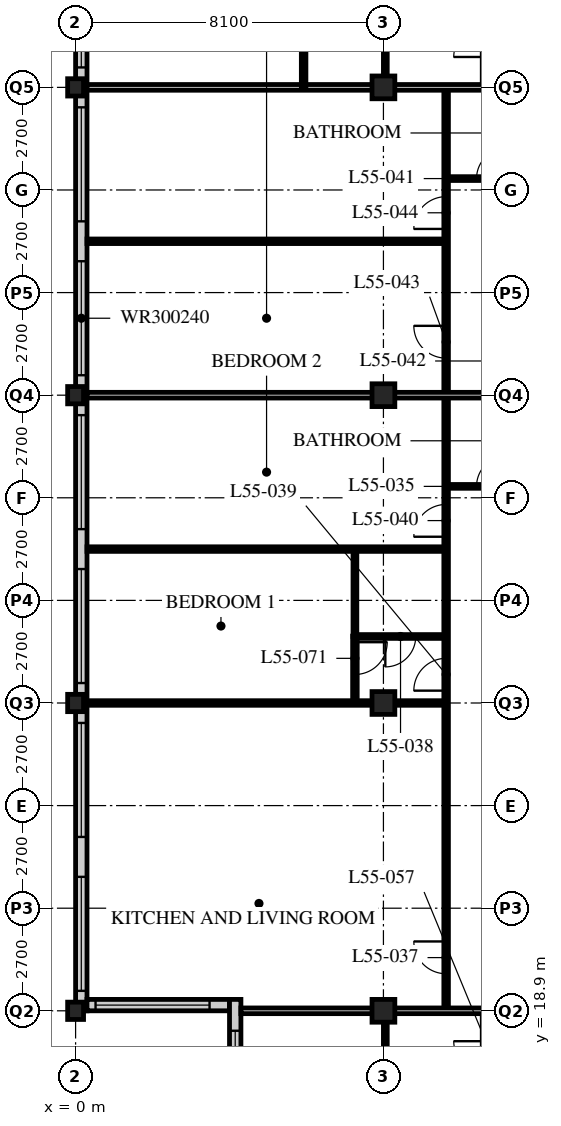
"""IFC4 building model, lengths in metres.
Left out: names, types, materials, properties, quantities, classifications, styles, units other than length and angle.
Written with IfcOpenShell. Run it as: python <this file> out.ifc"""

import sys

from ifc_helpers import new_model, si_unit, direction, frame, frame_2d, origin, origin_2d, place, context, subcontext, project, spatial, rectangle, hollow_rectangle, i_section, extrude, element, fill, save


model = new_model("IFC4")
c1 = context("Model", 3, precision=1e-05, world=origin(), true_north=direction((0.0, 1.0)))
c2 = subcontext(c1, "Body", "Model", "MODEL_VIEW")
j1 = project(units=[si_unit("LENGTHUNIT", "METRE"), si_unit("PLANEANGLEUNIT", "RADIAN")], contexts=[c1])
p1 = place(None, origin())
s1 = spatial("IfcSite", under=j1, at=p1, CompositionType="ELEMENT")
p2 = place(p1, origin())
s2 = spatial("IfcBuilding", under=s1, at=p2, CompositionType="ELEMENT")
p3 = place(p2, frame((0.0, 0.0, 213.6)))
s3 = spatial("IfcBuildingStorey", under=s2, at=p3, CompositionType="ELEMENT", Elevation=213.6)
for number, where, z_axis, x_axis in (
    (1, (0.0, 18.9, 0.0), (0.0, 0.0, 1.0), (1.0, 0.0, 0.0)),
    (2, (0.0, 27.0, 0.0), (0.0, 0.0, 1.0), (1.0, 0.0, 0.0)),
    (3, (0.0, 35.1, 0.0), (0.0, 0.0, 1.0), (1.0, 0.0, 0.0)),
    (4, (0.0, 43.2, 0.0), (0.0, 0.0, 1.0), (1.0, 0.0, 0.0)),
):
    element("IfcColumn", number, at=place(p3, frame(where, z_axis=z_axis, x_axis=x_axis)), inside=s3, PredefinedType="COLUMN", context=c2, shape_type="SweptSolid", body=[
        extrude(i_section(OverallWidth=0.418, OverallDepth=0.456, WebThickness=0.042, FlangeThickness=0.067, FilletRadius=0.015, at=origin_2d()), origin(), (0.0, 0.0, 1.0), 3.6),
    ])
for number, where, z_axis, x_axis in (
    (5, (8.1, 18.9, 0.0), (0.0, 0.0, 1.0), (1.0, 0.0, 0.0)),
    (6, (8.1, 27.0, 0.0), (0.0, 0.0, 1.0), (1.0, 0.0, 0.0)),
    (7, (8.1, 35.1, 0.0), (0.0, 0.0, 1.0), (1.0, 0.0, 0.0)),
    (8, (8.1, 43.2, 0.0), (0.0, 0.0, 1.0), (1.0, 0.0, 0.0)),
):
    element("IfcColumn", number, at=place(p3, frame(where, z_axis=z_axis, x_axis=x_axis)), inside=s3, PredefinedType="COLUMN", context=c2, shape_type="SweptSolid", body=[
        extrude(hollow_rectangle(XDim=0.6, YDim=0.6, WallThickness=0.05, at=origin_2d()), origin(), (0.0, 0.0, 1.0), 3.6),
    ])
p4 = place(p3, frame((0.15, 51.0, 0.0), z_axis=(0.0, 0.0, 1.0), x_axis=(0.0, -1.0, 0.0)))
e9 = element("IfcWall", 9, at=p4, inside=s3, PredefinedType="SOLIDWALL", context=c2, shape_type="SweptSolid", body=[
    extrude(rectangle(XDim=32.1, YDim=0.3, at=frame_2d((16.05, 0.0))), origin(), (0.0, 0.0, 1.0), 3.39),
])
p5 = place(p4, frame((0.225, 0.0, 0.6)))
e10 = element("IfcOpeningElement", 10, at=p5, cuts=e9, PredefinedType="OPENING", context=c2, shape_type="SweptSolid", body=[
    extrude(rectangle(XDim=3.0, YDim=2.4, at=frame_2d((1.5, 1.2))), frame((0.0, 0.16, 0.0), z_axis=(0.0, -1.0, 0.0), x_axis=(1.0, 0.0, 0.0)), (0.0, 0.0, 1.0), 0.32),
])
p6 = place(p4, frame((4.275, 0.0, 0.6)))
e11 = element("IfcOpeningElement", 11, at=p6, cuts=e9, PredefinedType="OPENING", context=c2, shape_type="SweptSolid", body=[
    extrude(rectangle(XDim=3.0, YDim=2.4, at=frame_2d((1.5, 1.2))), frame((0.0, 0.16, 0.0), z_axis=(0.0, -1.0, 0.0), x_axis=(1.0, 0.0, 0.0)), (0.0, 0.0, 1.0), 0.32),
])
p7 = place(p4, frame((8.325, 0.0, 0.6)))
e12 = element("IfcOpeningElement", 12, at=p7, cuts=e9, PredefinedType="OPENING", context=c2, shape_type="SweptSolid", body=[
    extrude(rectangle(XDim=3.0, YDim=2.4, at=frame_2d((1.5, 1.2))), frame((0.0, 0.16, 0.0), z_axis=(0.0, -1.0, 0.0), x_axis=(1.0, 0.0, 0.0)), (0.0, 0.0, 1.0), 0.32),
])
p8 = place(p4, frame((12.375, 0.0, 0.6)))
e13 = element("IfcOpeningElement", 13, at=p8, cuts=e9, PredefinedType="OPENING", context=c2, shape_type="SweptSolid", body=[
    extrude(rectangle(XDim=3.0, YDim=2.4, at=frame_2d((1.5, 1.2))), frame((0.0, 0.16, 0.0), z_axis=(0.0, -1.0, 0.0), x_axis=(1.0, 0.0, 0.0)), (0.0, 0.0, 1.0), 0.32),
])
p9 = place(p4, frame((16.425, 0.0, 0.6)))
e14 = element("IfcOpeningElement", 14, at=p9, cuts=e9, PredefinedType="OPENING", context=c2, shape_type="SweptSolid", body=[
    extrude(rectangle(XDim=3.0, YDim=2.4, at=frame_2d((1.5, 1.2))), frame((0.0, 0.16, 0.0), z_axis=(0.0, -1.0, 0.0), x_axis=(1.0, 0.0, 0.0)), (0.0, 0.0, 1.0), 0.32),
])
p10 = place(p4, frame((20.475, 0.0, 0.6)))
e15 = element("IfcOpeningElement", 15, at=p10, cuts=e9, PredefinedType="OPENING", context=c2, shape_type="SweptSolid", body=[
    extrude(rectangle(XDim=3.0, YDim=2.4, at=frame_2d((1.5, 1.2))), frame((0.0, 0.16, 0.0), z_axis=(0.0, -1.0, 0.0), x_axis=(1.0, 0.0, 0.0)), (0.0, 0.0, 1.0), 0.32),
])
p11 = place(p4, frame((24.525, 0.0, 0.6)))
e16 = element("IfcOpeningElement", 16, at=p11, cuts=e9, PredefinedType="OPENING", context=c2, shape_type="SweptSolid", body=[
    extrude(rectangle(XDim=3.0, YDim=2.4, at=frame_2d((1.5, 1.2))), frame((0.0, 0.16, 0.0), z_axis=(0.0, -1.0, 0.0), x_axis=(1.0, 0.0, 0.0)), (0.0, 0.0, 1.0), 0.32),
])
p12 = place(p4, frame((28.575, 0.0, 0.6)))
e17 = element("IfcOpeningElement", 17, at=p12, cuts=e9, PredefinedType="OPENING", context=c2, shape_type="SweptSolid", body=[
    extrude(rectangle(XDim=3.0, YDim=2.4, at=frame_2d((1.5, 1.2))), frame((0.0, 0.16, 0.0), z_axis=(0.0, -1.0, 0.0), x_axis=(1.0, 0.0, 0.0)), (0.0, 0.0, 1.0), 0.32),
])
p13 = place(p3, frame((0.3, 19.05, 0.0), z_axis=(0.0, 0.0, 1.0), x_axis=(1.0, 0.0, 0.0)))
e18 = element("IfcWall", 18, at=p13, inside=s3, PredefinedType="SOLIDWALL", context=c2, shape_type="SweptSolid", body=[
    extrude(rectangle(XDim=3.75, YDim=0.3, at=frame_2d((1.875, 0.0))), origin(), (0.0, 0.0, 1.0), 3.39),
])
p14 = place(p13, frame((0.225, 0.0, 0.6)))
e19 = element("IfcOpeningElement", 19, at=p14, cuts=e18, PredefinedType="OPENING", context=c2, shape_type="SweptSolid", body=[
    extrude(rectangle(XDim=3.0, YDim=2.0, at=frame_2d((1.5, 1.0))), frame((0.0, 0.16, 0.0), z_axis=(0.0, -1.0, 0.0), x_axis=(1.0, 0.0, 0.0)), (0.0, 0.0, 1.0), 0.32),
])
p15 = place(p3, frame((4.2, 19.2, 0.0), z_axis=(0.0, 0.0, 1.0), x_axis=(0.0, -1.0, 0.0)))
e20 = element("IfcWall", 20, at=p15, inside=s3, PredefinedType="SOLIDWALL", context=c2, shape_type="SweptSolid", body=[
    extrude(rectangle(XDim=4.35, YDim=0.3, at=frame_2d((2.175, 0.0))), origin(), (0.0, 0.0, 1.0), 3.39),
])
p16 = place(p15, frame((0.825, 0.0, 0.6)))
e21 = element("IfcOpeningElement", 21, at=p16, cuts=e20, PredefinedType="OPENING", context=c2, shape_type="SweptSolid", body=[
    extrude(rectangle(XDim=3.0, YDim=2.0, at=frame_2d((1.5, 1.0))), frame((0.0, 0.16, 0.0), z_axis=(0.0, -1.0, 0.0), x_axis=(1.0, 0.0, 0.0)), (0.0, 0.0, 1.0), 0.32),
])
p17 = place(p3, frame((9.75, 18.9, 0.0), z_axis=(0.0, 0.0, 1.0), x_axis=(0.0, 1.0, 0.0)))
e22 = element("IfcWall", 22, at=p17, inside=s3, PredefinedType="PARTITIONING", context=c2, shape_type="SweptSolid", body=[
    extrude(rectangle(XDim=24.3, YDim=0.12, at=frame_2d((12.15, 0.0))), origin(), (0.0, 0.0, 1.0), 3.39),
])
p18 = place(p17, frame((0.975, 0.0, 0.0)))
e23 = element("IfcOpeningElement", 23, at=p18, cuts=e22, PredefinedType="OPENING", context=c2, shape_type="SweptSolid", body=[
    extrude(rectangle(XDim=0.85, YDim=2.1, at=frame_2d((0.425, 1.05))), frame((0.0, 0.07, 0.0), z_axis=(0.0, -1.0, 0.0), x_axis=(1.0, 0.0, 0.0)), (0.0, 0.0, 1.0), 0.14),
])
p19 = place(p17, frame((8.425, 0.0, 0.0)))
e24 = element("IfcOpeningElement", 24, at=p19, cuts=e22, PredefinedType="OPENING", context=c2, shape_type="SweptSolid", body=[
    extrude(rectangle(XDim=0.85, YDim=2.1, at=frame_2d((0.425, 1.05))), frame((0.0, 0.07, 0.0), z_axis=(0.0, -1.0, 0.0), x_axis=(1.0, 0.0, 0.0)), (0.0, 0.0, 1.0), 0.14),
])
p20 = place(p17, frame((12.475, 0.0, 0.0)))
e25 = element("IfcOpeningElement", 25, at=p20, cuts=e22, PredefinedType="OPENING", context=c2, shape_type="SweptSolid", body=[
    extrude(rectangle(XDim=0.85, YDim=2.1, at=frame_2d((0.425, 1.05))), frame((0.0, 0.07, 0.0), z_axis=(0.0, -1.0, 0.0), x_axis=(1.0, 0.0, 0.0)), (0.0, 0.0, 1.0), 0.14),
])
p21 = place(p17, frame((17.175, 0.0, 0.0)))
e26 = element("IfcOpeningElement", 26, at=p21, cuts=e22, PredefinedType="OPENING", context=c2, shape_type="SweptSolid", body=[
    extrude(rectangle(XDim=0.85, YDim=2.1, at=frame_2d((0.425, 1.05))), frame((0.0, 0.07, 0.0), z_axis=(0.0, -1.0, 0.0), x_axis=(1.0, 0.0, 0.0)), (0.0, 0.0, 1.0), 0.14),
])
p22 = place(p17, frame((20.575, 0.0, 0.0)))
e27 = element("IfcOpeningElement", 27, at=p22, cuts=e22, PredefinedType="OPENING", context=c2, shape_type="SweptSolid", body=[
    extrude(rectangle(XDim=0.85, YDim=2.1, at=frame_2d((0.425, 1.05))), frame((0.0, 0.07, 0.0), z_axis=(0.0, -1.0, 0.0), x_axis=(1.0, 0.0, 0.0)), (0.0, 0.0, 1.0), 0.14),
])
p23 = place(p3, frame((12.15, 32.7, 0.0), z_axis=(0.0, 0.0, 1.0), x_axis=(-1.0, 0.0, 0.0)))
e28 = element("IfcWall", 28, at=p23, inside=s3, PredefinedType="PARTITIONING", context=c2, shape_type="SweptSolid", body=[
    extrude(rectangle(XDim=2.4, YDim=0.1, at=frame_2d((1.2, 0.0))), origin(), (0.0, 0.0, 1.0), 3.39),
])
p24 = place(p23, frame((0.8, 0.0, 0.0)))
e29 = element("IfcOpeningElement", 29, at=p24, cuts=e28, PredefinedType="OPENING", context=c2, shape_type="SweptSolid", body=[
    extrude(rectangle(XDim=0.8, YDim=2.1, at=frame_2d((0.4, 1.05))), frame((0.0, 0.06, 0.0), z_axis=(0.0, -1.0, 0.0), x_axis=(1.0, 0.0, 0.0)), (0.0, 0.0, 1.0), 0.12),
])
p25 = place(p3, frame((9.75, 28.75, 0.0), z_axis=(0.0, 0.0, 1.0), x_axis=(-1.0, 0.0, 0.0)))
e30 = element("IfcWall", 30, at=p25, inside=s3, PredefinedType="PARTITIONING", context=c2, shape_type="SweptSolid", body=[
    extrude(rectangle(XDim=2.4, YDim=0.1, at=frame_2d((1.2, 0.0))), origin(), (0.0, 0.0, 1.0), 3.39),
])
p26 = place(p25, frame((0.8, 0.0, 0.0)))
e31 = element("IfcOpeningElement", 31, at=p26, cuts=e30, PredefinedType="OPENING", context=c2, shape_type="SweptSolid", body=[
    extrude(rectangle(XDim=0.8, YDim=2.1, at=frame_2d((0.4, 1.05))), frame((0.0, 0.06, 0.0), z_axis=(0.0, -1.0, 0.0), x_axis=(1.0, 0.0, 0.0)), (0.0, 0.0, 1.0), 0.12),
])
p27 = place(p3, frame((7.35, 28.75, 0.0), z_axis=(0.0, 0.0, 1.0), x_axis=(0.0, 1.0, 0.0)))
e32 = element("IfcWall", 32, at=p27, inside=s3, PredefinedType="PARTITIONING", context=c2, shape_type="SweptSolid", body=[
    extrude(rectangle(XDim=2.3, YDim=0.1, at=frame_2d((1.15, 0.0))), origin(), (0.0, 0.0, 1.0), 3.39),
])
p28 = place(p3, frame((9.75, 27.0, 0.0), z_axis=(0.0, 0.0, 1.0), x_axis=(-1.0, 0.0, 0.0)))
e33 = element("IfcWall", 33, at=p28, inside=s3, PredefinedType="PARTITIONING", context=c2, shape_type="SweptSolid", body=[
    extrude(rectangle(XDim=9.45, YDim=0.12, at=frame_2d((4.725, 0.0))), origin(), (0.0, 0.0, 1.0), 2.778),
])
p29 = place(p3, frame((9.75, 31.05, 0.0), z_axis=(0.0, 0.0, 1.0), x_axis=(-1.0, 0.0, 0.0)))
e34 = element("IfcWall", 34, at=p29, inside=s3, PredefinedType="PARTITIONING", context=c2, shape_type="SweptSolid", body=[
    extrude(rectangle(XDim=9.45, YDim=0.12, at=frame_2d((4.725, 0.0))), origin(), (0.0, 0.0, 1.0), 3.39),
])
p30 = place(p3, frame((12.15, 35.1, 0.0), z_axis=(0.0, 0.0, 1.0), x_axis=(-1.0, 0.0, 0.0)))
e35 = element("IfcWall", 35, at=p30, inside=s3, PredefinedType="PARTITIONING", context=c2, shape_type="SweptSolid", body=[
    extrude(rectangle(XDim=11.85, YDim=0.15, at=frame_2d((5.925, 0.0))), origin(), (0.0, 0.0, 1.0), 2.778),
])
p31 = place(p3, frame((12.15, 40.8, 0.0), z_axis=(0.0, 0.0, 1.0), x_axis=(-1.0, 0.0, 0.0)))
e36 = element("IfcWall", 36, at=p31, inside=s3, PredefinedType="PARTITIONING", context=c2, shape_type="SweptSolid", body=[
    extrude(rectangle(XDim=2.4, YDim=0.1, at=frame_2d((1.2, 0.0))), origin(), (0.0, 0.0, 1.0), 3.39),
])
p32 = place(p31, frame((0.8, 0.0, 0.0)))
e37 = element("IfcOpeningElement", 37, at=p32, cuts=e36, PredefinedType="OPENING", context=c2, shape_type="SweptSolid", body=[
    extrude(rectangle(XDim=0.8, YDim=2.1, at=frame_2d((0.4, 1.05))), frame((0.0, 0.06, 0.0), z_axis=(0.0, -1.0, 0.0), x_axis=(1.0, 0.0, 0.0)), (0.0, 0.0, 1.0), 0.12),
])
p33 = place(p3, frame((9.75, 39.15, 0.0), z_axis=(0.0, 0.0, 1.0), x_axis=(-1.0, 0.0, 0.0)))
e38 = element("IfcWall", 38, at=p33, inside=s3, PredefinedType="PARTITIONING", context=c2, shape_type="SweptSolid", body=[
    extrude(rectangle(XDim=9.45, YDim=0.12, at=frame_2d((4.725, 0.0))), origin(), (0.0, 0.0, 1.0), 3.39),
])
p34 = place(p3, frame((8.15, 18.9, 0.0), z_axis=(0.0, 0.0, 1.0), x_axis=(0.0, -1.0, 0.0)))
e39 = element("IfcWall", 39, at=p34, inside=s3, PredefinedType="PARTITIONING", context=c2, shape_type="SweptSolid", body=[
    extrude(rectangle(XDim=2.4, YDim=0.1, at=frame_2d((1.2, 0.0))), origin(), (0.0, 0.0, 1.0), 2.778),
])
p35 = place(p3, frame((4.35, 18.9, 0.0), z_axis=(0.0, 0.0, 1.0), x_axis=(1.0, 0.0, 0.0)))
e40 = element("IfcWall", 40, at=p35, inside=s3, PredefinedType="PARTITIONING", context=c2, shape_type="SweptSolid", body=[
    extrude(rectangle(XDim=7.8, YDim=0.15, at=frame_2d((3.9, 0.0))), origin(), (0.0, 0.0, 1.0), 2.778),
])
p36 = place(p3, frame((8.15, 43.2, 0.0), z_axis=(0.0, 0.0, 1.0), x_axis=(0.0, 1.0, 0.0)))
e41 = element("IfcWall", 41, at=p36, inside=s3, PredefinedType="PARTITIONING", context=c2, shape_type="SweptSolid", body=[
    extrude(rectangle(XDim=2.4, YDim=0.1, at=frame_2d((1.2, 0.0))), origin(), (0.0, 0.0, 1.0), 2.778),
])
p37 = place(p3, frame((0.3, 43.2, 0.0), z_axis=(0.0, 0.0, 1.0), x_axis=(1.0, 0.0, 0.0)))
e42 = element("IfcWall", 42, at=p37, inside=s3, PredefinedType="PARTITIONING", context=c2, shape_type="SweptSolid", body=[
    extrude(rectangle(XDim=11.85, YDim=0.15, at=frame_2d((5.925, 0.0))), origin(), (0.0, 0.0, 1.0), 2.778),
])
p38 = place(p3, frame((7.35, 27.0, 0.0), z_axis=(0.0, 0.0, 1.0), x_axis=(0.0, 1.0, 0.0)))
e43 = element("IfcWall", 43, at=p38, inside=s3, PredefinedType="PARTITIONING", context=c2, shape_type="SweptSolid", body=[
    extrude(rectangle(XDim=1.76, YDim=0.12, at=frame_2d((0.88, 0.0))), origin(), (0.0, 0.0, 1.0), 3.39),
])
p39 = place(p38, frame((0.75, 0.0, 0.0)))
e44 = element("IfcOpeningElement", 44, at=p39, cuts=e43, PredefinedType="OPENING", context=c2, shape_type="SweptSolid", body=[
    extrude(rectangle(XDim=0.85, YDim=2.1, at=frame_2d((0.425, 1.05))), frame((0.0, 0.07, 0.0), z_axis=(0.0, -1.0, 0.0), x_axis=(1.0, 0.0, 0.0)), (0.0, 0.0, 1.0), 0.14),
])
p40 = place(p3, frame((6.0, 43.2, 0.0), z_axis=(0.0, 0.0, 1.0), x_axis=(0.0, 1.0, 0.0)))
e45 = element("IfcWall", 45, at=p40, inside=s3, PredefinedType="PARTITIONING", context=c2, shape_type="SweptSolid", body=[
    extrude(rectangle(XDim=11.85, YDim=0.12, at=frame_2d((5.925, 0.0))), origin(), (0.0, 0.0, 1.0), 3.39),
])
p41 = place(p40, frame((5.5, 0.0, 0.0)))
e46 = element("IfcOpeningElement", 46, at=p41, cuts=e45, PredefinedType="OPENING", context=c2, shape_type="SweptSolid", body=[
    extrude(rectangle(XDim=0.85, YDim=2.1, at=frame_2d((0.425, 1.05))), frame((0.0, 0.07, 0.0), z_axis=(0.0, -1.0, 0.0), x_axis=(1.0, 0.0, 0.0)), (0.0, 0.0, 1.0), 0.14),
])
p42 = place(p6, origin())
e47 = element("IfcWindow", 47, at=p42, inside=s3, PartitioningType="SINGLE_PANEL", PredefinedType="WINDOW", context=c2, shape_type="SweptSolid", body=[
    extrude(rectangle(XDim=3.0, YDim=2.4, at=frame_2d((1.5, 1.2))), frame((0.0, 0.03, 0.0), z_axis=(0.0, -1.0, 0.0), x_axis=(1.0, 0.0, 0.0)), (0.0, 0.0, 1.0), 0.06),
])
fill(e11, e47)
p43 = place(p7, origin())
e48 = element("IfcWindow", 48, at=p43, inside=s3, PartitioningType="SINGLE_PANEL", PredefinedType="WINDOW", context=c2, shape_type="SweptSolid", body=[
    extrude(rectangle(XDim=3.0, YDim=2.4, at=frame_2d((1.5, 1.2))), frame((0.0, 0.03, 0.0), z_axis=(0.0, -1.0, 0.0), x_axis=(1.0, 0.0, 0.0)), (0.0, 0.0, 1.0), 0.06),
])
fill(e12, e48)
p44 = place(p8, origin())
e49 = element("IfcWindow", 49, at=p44, inside=s3, PartitioningType="SINGLE_PANEL", PredefinedType="WINDOW", context=c2, shape_type="SweptSolid", body=[
    extrude(rectangle(XDim=3.0, YDim=2.4, at=frame_2d((1.5, 1.2))), frame((0.0, 0.03, 0.0), z_axis=(0.0, -1.0, 0.0), x_axis=(1.0, 0.0, 0.0)), (0.0, 0.0, 1.0), 0.06),
])
fill(e13, e49)
p45 = place(p9, origin())
e50 = element("IfcWindow", 50, at=p45, inside=s3, PartitioningType="SINGLE_PANEL", PredefinedType="WINDOW", context=c2, shape_type="SweptSolid", body=[
    extrude(rectangle(XDim=3.0, YDim=2.4, at=frame_2d((1.5, 1.2))), frame((0.0, 0.03, 0.0), z_axis=(0.0, -1.0, 0.0), x_axis=(1.0, 0.0, 0.0)), (0.0, 0.0, 1.0), 0.06),
])
fill(e14, e50)
p46 = place(p10, origin())
e51 = element("IfcWindow", 51, at=p46, inside=s3, PartitioningType="SINGLE_PANEL", PredefinedType="WINDOW", context=c2, shape_type="SweptSolid", body=[
    extrude(rectangle(XDim=3.0, YDim=2.4, at=frame_2d((1.5, 1.2))), frame((0.0, 0.03, 0.0), z_axis=(0.0, -1.0, 0.0), x_axis=(1.0, 0.0, 0.0)), (0.0, 0.0, 1.0), 0.06),
])
fill(e15, e51)
p47 = place(p11, origin())
e52 = element("IfcWindow", 52, at=p47, inside=s3, PartitioningType="SINGLE_PANEL", PredefinedType="WINDOW", context=c2, shape_type="SweptSolid", body=[
    extrude(rectangle(XDim=3.0, YDim=2.4, at=frame_2d((1.5, 1.2))), frame((0.0, 0.03, 0.0), z_axis=(0.0, -1.0, 0.0), x_axis=(1.0, 0.0, 0.0)), (0.0, 0.0, 1.0), 0.06),
])
fill(e16, e52)
p48 = place(p12, origin())
e53 = element("IfcWindow", 53, at=p48, inside=s3, PartitioningType="SINGLE_PANEL", PredefinedType="WINDOW", context=c2, shape_type="SweptSolid", body=[
    extrude(rectangle(XDim=3.0, YDim=2.4, at=frame_2d((1.5, 1.2))), frame((0.0, 0.03, 0.0), z_axis=(0.0, -1.0, 0.0), x_axis=(1.0, 0.0, 0.0)), (0.0, 0.0, 1.0), 0.06),
])
fill(e17, e53)
p49 = place(p14, origin())
e54 = element("IfcWindow", 54, at=p49, inside=s3, PartitioningType="SINGLE_PANEL", PredefinedType="WINDOW", context=c2, shape_type="SweptSolid", body=[
    extrude(rectangle(XDim=3.0, YDim=2.0, at=frame_2d((1.5, 1.0))), frame((0.0, 0.03, 0.0), z_axis=(0.0, -1.0, 0.0), x_axis=(1.0, 0.0, 0.0)), (0.0, 0.0, 1.0), 0.06),
])
fill(e19, e54)
p50 = place(p16, origin())
e55 = element("IfcWindow", 55, at=p50, inside=s3, PartitioningType="SINGLE_PANEL", PredefinedType="WINDOW", context=c2, shape_type="SweptSolid", body=[
    extrude(rectangle(XDim=3.0, YDim=2.0, at=frame_2d((1.5, 1.0))), frame((0.0, 0.03, 0.0), z_axis=(0.0, -1.0, 0.0), x_axis=(1.0, 0.0, 0.0)), (0.0, 0.0, 1.0), 0.06),
])
fill(e21, e55)
p51 = place(p24, origin())
e56 = element("IfcDoor", 56, at=p51, inside=s3, OperationType="SINGLE_SWING_RIGHT", PredefinedType="DOOR", context=c2, shape_type="SweptSolid", body=[
    extrude(rectangle(XDim=0.8, YDim=2.1, at=frame_2d((0.4, 1.05))), frame((0.0, 0.025, 0.0), z_axis=(0.0, -1.0, 0.0), x_axis=(1.0, 0.0, 0.0)), (0.0, 0.0, 1.0), 0.05),
])
fill(e29, e56)
p52 = place(p18, origin())
e57 = element("IfcDoor", 57, at=p52, inside=s3, OperationType="SINGLE_SWING_RIGHT", PredefinedType="DOOR", context=c2, shape_type="SweptSolid", body=[
    extrude(rectangle(XDim=0.85, YDim=2.1, at=frame_2d((0.425, 1.05))), frame((0.0, 0.025, 0.0), z_axis=(0.0, -1.0, 0.0), x_axis=(1.0, 0.0, 0.0)), (0.0, 0.0, 1.0), 0.05),
])
fill(e23, e57)
p53 = place(p26, origin())
e58 = element("IfcDoor", 58, at=p53, inside=s3, OperationType="SINGLE_SWING_RIGHT", PredefinedType="DOOR", context=c2, shape_type="SweptSolid", body=[
    extrude(rectangle(XDim=0.8, YDim=2.1, at=frame_2d((0.4, 1.05))), frame((0.0, 0.025, 0.0), z_axis=(0.0, -1.0, 0.0), x_axis=(1.0, 0.0, 0.0)), (0.0, 0.0, 1.0), 0.05),
])
fill(e31, e58)
p54 = place(p19, origin())
e59 = element("IfcDoor", 59, at=p54, inside=s3, OperationType="SINGLE_SWING_LEFT", PredefinedType="DOOR", context=c2, shape_type="SweptSolid", body=[
    extrude(rectangle(XDim=0.85, YDim=2.1, at=frame_2d((0.425, 1.05))), frame((0.0, 0.025, 0.0), z_axis=(0.0, -1.0, 0.0), x_axis=(1.0, 0.0, 0.0)), (0.0, 0.0, 1.0), 0.05),
])
fill(e24, e59)
p55 = place(p20, origin())
e60 = element("IfcDoor", 60, at=p55, inside=s3, OperationType="SINGLE_SWING_LEFT", PredefinedType="DOOR", context=c2, shape_type="SweptSolid", body=[
    extrude(rectangle(XDim=0.85, YDim=2.1, at=frame_2d((0.425, 1.05))), frame((0.0, 0.025, 0.0), z_axis=(0.0, -1.0, 0.0), x_axis=(1.0, 0.0, 0.0)), (0.0, 0.0, 1.0), 0.05),
])
fill(e25, e60)
p56 = place(p32, origin())
e61 = element("IfcDoor", 61, at=p56, inside=s3, OperationType="SINGLE_SWING_RIGHT", PredefinedType="DOOR", context=c2, shape_type="SweptSolid", body=[
    extrude(rectangle(XDim=0.8, YDim=2.1, at=frame_2d((0.4, 1.05))), frame((0.0, 0.025, 0.0), z_axis=(0.0, -1.0, 0.0), x_axis=(1.0, 0.0, 0.0)), (0.0, 0.0, 1.0), 0.05),
])
fill(e37, e61)
p57 = place(p21, origin())
e62 = element("IfcDoor", 62, at=p57, inside=s3, OperationType="SINGLE_SWING_RIGHT", PredefinedType="DOOR", context=c2, shape_type="SweptSolid", body=[
    extrude(rectangle(XDim=0.85, YDim=2.1, at=frame_2d((0.425, 1.05))), frame((0.0, 0.025, 0.0), z_axis=(0.0, -1.0, 0.0), x_axis=(1.0, 0.0, 0.0)), (0.0, 0.0, 1.0), 0.05),
])
fill(e26, e62)
p58 = place(p22, origin())
e63 = element("IfcDoor", 63, at=p58, inside=s3, OperationType="SINGLE_SWING_LEFT", PredefinedType="DOOR", context=c2, shape_type="SweptSolid", body=[
    extrude(rectangle(XDim=0.85, YDim=2.1, at=frame_2d((0.425, 1.05))), frame((0.0, 0.025, 0.0), z_axis=(0.0, -1.0, 0.0), x_axis=(1.0, 0.0, 0.0)), (0.0, 0.0, 1.0), 0.05),
])
fill(e27, e63)
p59 = place(p39, origin())
e64 = element("IfcDoor", 64, at=p59, inside=s3, OperationType="SINGLE_SWING_LEFT", PredefinedType="DOOR", context=c2, shape_type="SweptSolid", body=[
    extrude(rectangle(XDim=0.85, YDim=2.1, at=frame_2d((0.425, 1.05))), frame((0.0, 0.025, 0.0), z_axis=(0.0, -1.0, 0.0), x_axis=(1.0, 0.0, 0.0)), (0.0, 0.0, 1.0), 0.05),
])
fill(e44, e64)
save(model, sys.argv[1])
